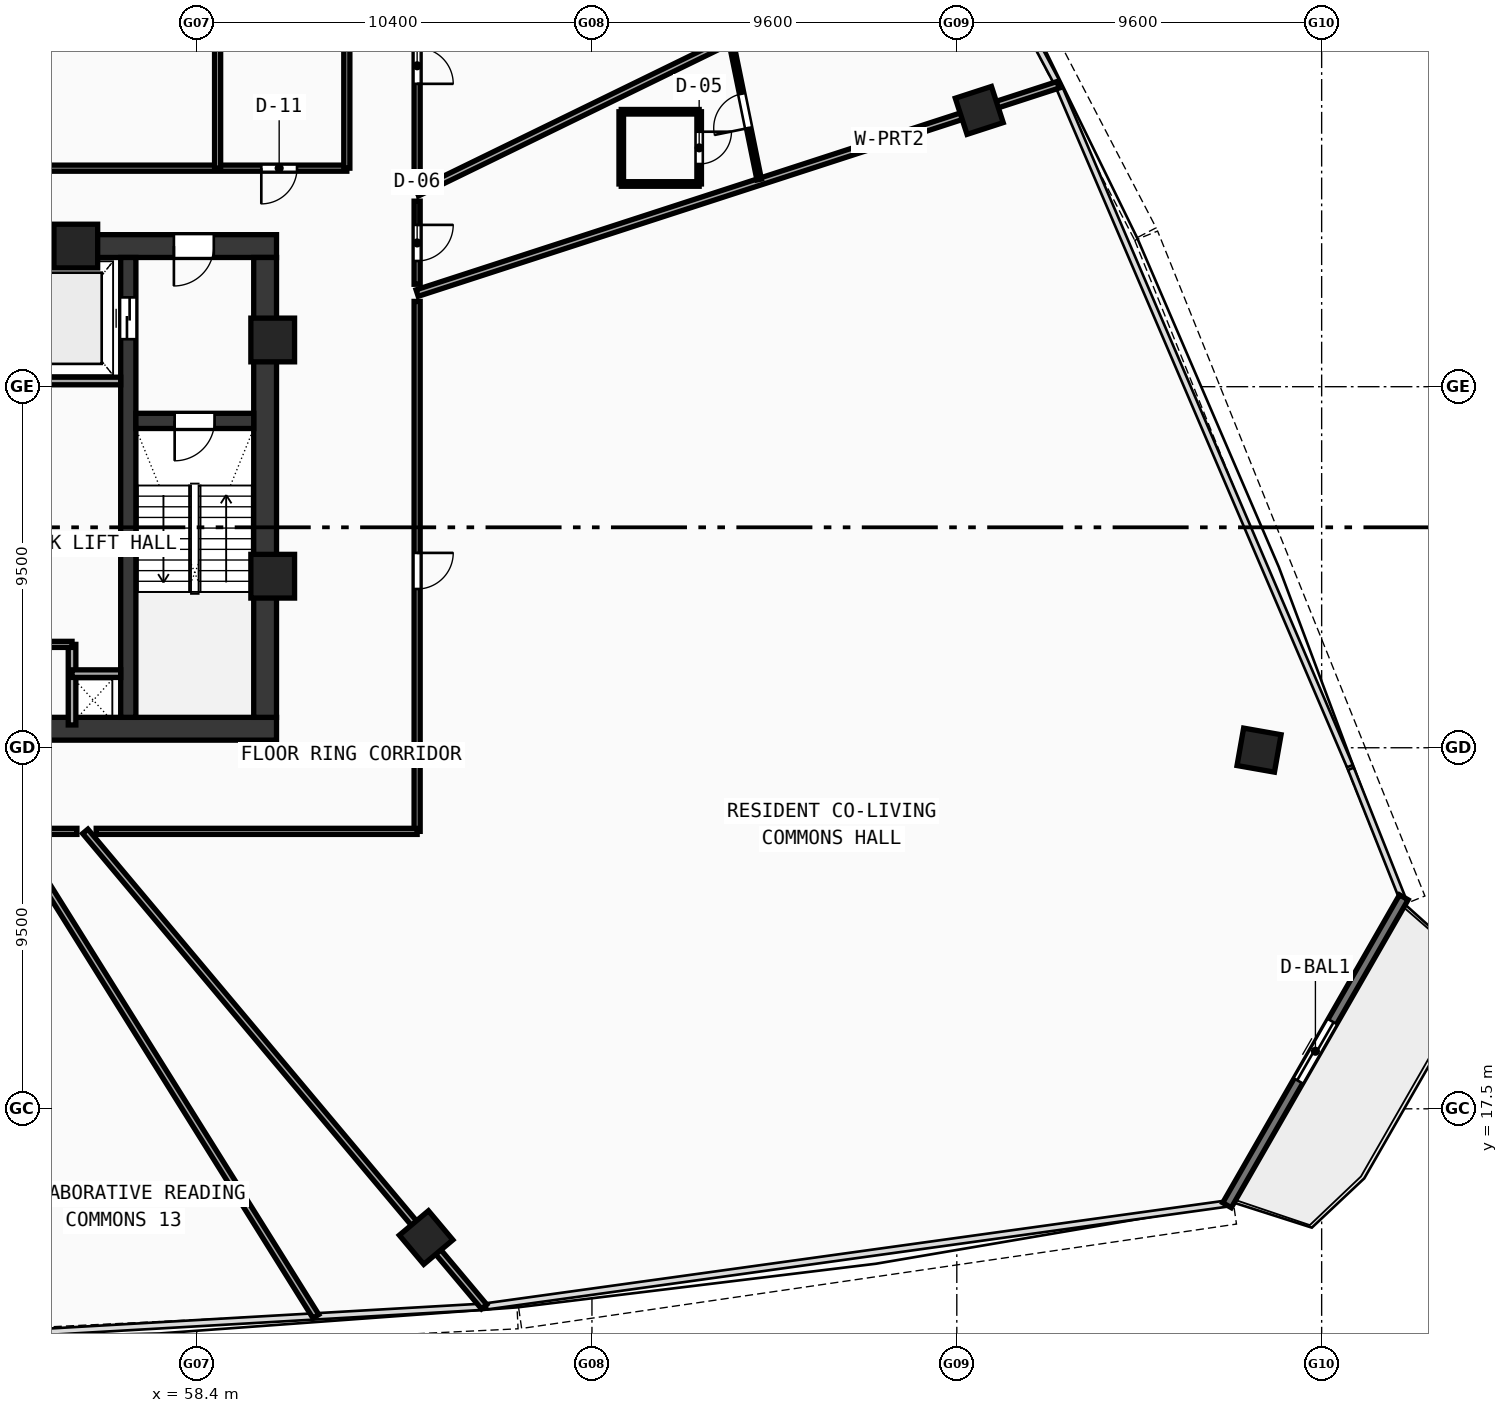
"""IFC4 building model, lengths in metres.
Left out: names, types, materials, properties, quantities, classifications, styles, units other than length and angle.
Written with IfcOpenShell. Run it as: python <this file> out.ifc"""

import sys

from ifc_helpers import new_model, si_unit, direction, frame, frame_2d, origin, origin_with_axes, origin_2d, place, context, subcontext, project, spatial, rectangle, hollow_rectangle, extrude, source, transform, mapped, element, fill, save


model = new_model("IFC4")
c1 = context("Model", 3, precision=1e-05, world=origin(), true_north=direction((0.0, 1.0)))
c2 = subcontext(c1, "Body", "Model", "MODEL_VIEW")
j1 = project(units=[si_unit("LENGTHUNIT", "METRE"), si_unit("PLANEANGLEUNIT", "RADIAN")], contexts=[c1])
p1 = place(None, origin())
s1 = spatial("IfcSite", under=j1, at=p1, CompositionType="ELEMENT")
p2 = place(p1, origin())
s2 = spatial("IfcBuilding", under=s1, at=p2, CompositionType="ELEMENT")
p3 = place(p2, frame((0.0, 0.0, 88.78)))
s3 = spatial("IfcBuildingStorey", under=s2, at=p3, CompositionType="ELEMENT", Elevation=88.78)
p4 = place(p3, frame((35.5, 27.5, 0.0), z_axis=(0.0, 0.0, 1.0), x_axis=(1.0, 0.0, 0.0)))
e1 = element("IfcWall", 1, at=p4, inside=s3, PredefinedType="SHEAR", context=c2, shape_type="SweptSolid", body=[
    extrude(rectangle(XDim=25.0, YDim=0.6, at=frame_2d((12.5, 0.0))), origin(), (0.0, 0.0, 1.0), 3.54),
])
p5 = place(p3, frame((49.2, 40.2, 0.0), z_axis=(0.0, 0.0, 1.0), x_axis=(1.0, 0.0, 0.0)))
e2 = element("IfcWall", 2, at=p5, inside=s3, PredefinedType="SHEAR", context=c2, shape_type="SweptSolid", body=[
    extrude(rectangle(XDim=11.3, YDim=0.6, at=frame_2d((5.65, 0.0))), origin(), (0.0, 0.0, 1.0), 3.54),
])
p6 = place(p5, frame((8.6, 0.0, 0.0)))
e3 = element("IfcOpeningElement", 3, at=p6, cuts=e2, PredefinedType="OPENING", context=c2, shape_type="SweptSolid", body=[
    extrude(rectangle(XDim=1.05, YDim=2.1, at=frame_2d((0.525, 1.05))), frame((0.0, 0.31, 0.0), z_axis=(0.0, -1.0, 0.0), x_axis=(1.0, 0.0, 0.0)), (0.0, 0.0, 1.0), 0.62),
])
p7 = place(p3, frame((60.2, 27.8, 0.0), z_axis=(0.0, 0.0, 1.0), x_axis=(0.0, 1.0, 0.0)))
e4 = element("IfcWall", 4, at=p7, inside=s3, PredefinedType="SHEAR", context=c2, shape_type="SweptSolid", body=[
    extrude(rectangle(XDim=12.1, YDim=0.6, at=frame_2d((6.05, 0.0))), origin(), (0.0, 0.0, 1.0), 3.54),
])
p8 = place(p3, frame((56.6, 27.8, 0.0), z_axis=(0.0, 0.0, 1.0), x_axis=(0.0, 1.0, 0.0)))
e5 = element("IfcWall", 5, at=p8, inside=s3, PredefinedType="SHEAR", context=c2, shape_type="SweptSolid", body=[
    extrude(rectangle(XDim=12.1, YDim=0.4, at=frame_2d((6.05, 0.0))), origin(), (0.0, 0.0, 1.0), 3.54),
])
p9 = place(p8, frame((9.95, 0.0, 0.0)))
e6 = element("IfcOpeningElement", 6, at=p9, cuts=e5, PredefinedType="OPENING", context=c2, shape_type="SweptSolid", body=[
    extrude(rectangle(XDim=1.1, YDim=2.1, at=frame_2d((0.55, 1.05))), frame((0.0, 0.21, 0.0), z_axis=(0.0, -1.0, 0.0), x_axis=(1.0, 0.0, 0.0)), (0.0, 0.0, 1.0), 0.42),
])
p10 = place(p3, frame((56.8, 35.6, 0.0), z_axis=(0.0, 0.0, 1.0), x_axis=(1.0, 0.0, 0.0)))
e7 = element("IfcWall", 7, at=p10, inside=s3, PredefinedType="SHEAR", context=c2, shape_type="SweptSolid", body=[
    extrude(rectangle(XDim=3.1, YDim=0.4, at=frame_2d((1.55, 0.0))), origin(), (0.0, 0.0, 1.0), 3.54),
])
p11 = place(p10, frame((1.02, 0.0, 0.0)))
e8 = element("IfcOpeningElement", 8, at=p11, cuts=e7, PredefinedType="OPENING", context=c2, shape_type="SweptSolid", body=[
    extrude(rectangle(XDim=1.05, YDim=2.1, at=frame_2d((0.525, 1.05))), frame((0.0, 0.21, 0.0), z_axis=(0.0, -1.0, 0.0), x_axis=(1.0, 0.0, 0.0)), (0.0, 0.0, 1.0), 0.42),
])
m1 = source(origin(), c2, "Body", "SweptSolid", [
    extrude(hollow_rectangle(XDim=1.15, YDim=1.15, WallThickness=0.048, at=origin_2d()), origin(), (0.0, 0.0, 1.0), 3.8),
])
for number, where, z_axis, x_axis in (
    (9, (60.4, 31.513, -0.26), (0.0, 0.0, 1.0), (1.0, 0.0, 0.0)),
    (10, (60.4, 37.729, -0.26), (0.0, 0.0, 1.0), (1.0, 0.0, 0.0)),
    (11, (55.219, 40.2, -0.26), (0.0, 0.0, 1.0), (1.0, 0.0, 0.0)),
):
    element("IfcColumn", number, at=place(p3, frame(where, z_axis=z_axis, x_axis=x_axis)), inside=s3, PredefinedType="COLUMN", context=c2, shape_type="MappedRepresentation", body=[
        mapped(m1, transform((0.0, 0.0, 0.0), scale=1.0)),
    ])
m2 = source(origin(), c2, "Body", "SweptSolid", [
    extrude(hollow_rectangle(XDim=1.0, YDim=1.0, WallThickness=0.042, at=origin_2d()), origin(), (0.0, 0.0, 1.0), 3.8),
])
for number, where, z_axis, x_axis in (
    (12, (64.436, 14.112, -0.26), (0.0, 0.0, 1.0), (0.766, 0.643, 0.0)),
    (13, (86.353, 26.938, -0.26), (0.0, 0.0, 1.0), (0.174, 0.985, 0.0)),
    (14, (78.991, 43.77, -0.26), (0.0, 0.0, 1.0), (-0.309, 0.951, 0.0)),
):
    element("IfcColumn", number, at=place(p3, frame(where, z_axis=z_axis, x_axis=x_axis)), inside=s3, PredefinedType="COLUMN", context=c2, shape_type="MappedRepresentation", body=[
        mapped(m2, transform((0.0, 0.0, 0.0), scale=1.0)),
    ])
p12 = place(p3, frame((85.51, 14.963, 0.0), z_axis=(0.0, 0.0, 1.0), x_axis=(0.497922114025, 0.867221752705, 0.0)))
e15 = element("IfcWall", 15, at=p12, inside=s3, PredefinedType="STANDARD", context=c2, shape_type="SweptSolid", body=[
    extrude(rectangle(XDim=9.343, YDim=0.26, at=frame_2d((4.671, 0.0))), origin(), (0.0, 0.0, 1.0), 3.54),
])
p13 = place(p12, frame((3.771, 0.0, 0.0)))
e16 = element("IfcOpeningElement", 16, at=p13, cuts=e15, PredefinedType="OPENING", context=c2, shape_type="SweptSolid", body=[
    extrude(rectangle(XDim=1.8, YDim=2.15, at=frame_2d((0.9, 1.075))), frame((0.0, 0.14, 0.0), z_axis=(0.0, -1.0, 0.0), x_axis=(1.0, 0.0, 0.0)), (0.0, 0.0, 1.0), 0.28),
])
p14 = place(p3, frame((53.68, 36.65, 0.0), z_axis=(0.0, 0.0, 1.0), x_axis=(1.0, 0.0, 0.0)))
e17 = element("IfcWall", 17, at=p14, inside=s3, PredefinedType="SOLIDWALL", context=c2, shape_type="SweptSolid", body=[
    extrude(rectangle(XDim=2.72, YDim=0.2, at=frame_2d((1.36, 0.0))), origin(), (0.0, 0.0, 1.0), 3.54),
])
p15 = place(p3, frame((55.12, 27.6, 0.0), z_axis=(0.0, 0.0, 1.0), x_axis=(0.0, 1.0, 0.0)))
e18 = element("IfcWall", 18, at=p15, inside=s3, PredefinedType="SOLIDWALL", context=c2, shape_type="SweptSolid", body=[
    extrude(rectangle(XDim=2.12, YDim=0.2, at=frame_2d((1.06, 0.0))), origin(), (0.0, 0.0, 1.0), 3.54),
])
p16 = place(p3, frame((55.12, 28.95, 0.0), z_axis=(0.0, 0.0, 1.0), x_axis=(1.0, 0.0, 0.0)))
e19 = element("IfcWall", 19, at=p16, inside=s3, PredefinedType="SOLIDWALL", context=c2, shape_type="SweptSolid", body=[
    extrude(rectangle(XDim=1.28, YDim=0.2, at=frame_2d((0.64, 0.0))), origin(), (0.0, 0.0, 1.0), 3.54),
])
p17 = place(p3, frame((51.05, 29.72, 0.0), z_axis=(0.0, 0.0, 1.0), x_axis=(1.0, 0.0, 0.0)))
e20 = element("IfcWall", 20, at=p17, inside=s3, PredefinedType="PARTITIONING", context=c2, shape_type="SweptSolid", body=[
    extrude(rectangle(XDim=4.07, YDim=0.16, at=frame_2d((2.035, 0.0))), origin(), (0.0, 0.0, 1.0), 3.54),
])
p18 = place(p17, frame((0.5, 0.0, 0.0)))
e21 = element("IfcOpeningElement", 21, at=p18, cuts=e20, PredefinedType="OPENING", context=c2, shape_type="SweptSolid", body=[
    extrude(rectangle(XDim=0.9, YDim=2.1, at=frame_2d((0.45, 1.05))), frame((0.0, 0.09, 0.0), z_axis=(0.0, -1.0, 0.0), x_axis=(1.0, 0.0, 0.0)), (0.0, 0.0, 1.0), 0.18),
])
p19 = place(p3, frame((45.92, 42.25, 0.0), z_axis=(0.0, 0.0, 1.0), x_axis=(1.0, 0.0, 0.0)))
e22 = element("IfcWall", 22, at=p19, inside=s3, PredefinedType="PARTITIONING", context=c2, shape_type="SweptSolid", body=[
    extrude(rectangle(XDim=16.43, YDim=0.16, at=frame_2d((8.215, 0.0))), origin(), (0.0, 0.0, 1.0), 2.84),
])
p20 = place(p19, frame((2.1, 0.0, 0.0)))
e23 = element("IfcOpeningElement", 23, at=p20, cuts=e22, PredefinedType="OPENING", context=c2, shape_type="SweptSolid", body=[
    extrude(rectangle(XDim=0.92, YDim=2.1, at=frame_2d((0.46, 1.05))), frame((0.0, 0.09, 0.0), z_axis=(0.0, -1.0, 0.0), x_axis=(1.0, 0.0, 0.0)), (0.0, 0.0, 1.0), 0.18),
])
p21 = place(p19, frame((14.18, 0.0, 0.0)))
e24 = element("IfcOpeningElement", 24, at=p21, cuts=e22, PredefinedType="OPENING", context=c2, shape_type="SweptSolid", body=[
    extrude(rectangle(XDim=0.94, YDim=2.1, at=frame_2d((0.47, 1.05))), frame((0.0, 0.09, 0.0), z_axis=(0.0, -1.0, 0.0), x_axis=(1.0, 0.0, 0.0)), (0.0, 0.0, 1.0), 0.18),
])
p22 = place(p3, frame((62.35, 42.25, 0.0), z_axis=(0.0, 0.0, 1.0), x_axis=(0.0, 1.0, 0.0)))
e25 = element("IfcWall", 25, at=p22, inside=s3, PredefinedType="PARTITIONING", context=c2, shape_type="SweptSolid", body=[
    extrude(rectangle(XDim=7.55, YDim=0.16, at=frame_2d((3.775, 0.0))), origin(), (0.0, 0.0, 1.0), 2.84),
])
p23 = place(p3, frame((58.95, 42.25, 0.0), z_axis=(0.0, 0.0, 1.0), x_axis=(0.0, 1.0, 0.0)))
e26 = element("IfcWall", 26, at=p23, inside=s3, PredefinedType="PARTITIONING", context=c2, shape_type="SweptSolid", body=[
    extrude(rectangle(XDim=4.35, YDim=0.16, at=frame_2d((2.175, 0.0))), origin(), (0.0, 0.0, 1.0), 2.84),
])
p24 = place(p3, frame((64.2, 38.964, 0.0), z_axis=(0.0, 0.0, 1.0), x_axis=(0.951054301474, 0.309023810812, 0.0)))
e27 = element("IfcWall", 27, at=p24, inside=s3, PredefinedType="PARTITIONING", context=c2, shape_type="SweptSolid", body=[
    extrude(rectangle(XDim=17.733, YDim=0.18, at=frame_2d((8.867, 0.0))), origin(), (0.0, 0.0, 1.0), 2.84),
])
p25 = place(p3, frame((64.2, 41.601, 0.0), z_axis=(0.0, 0.0, 1.0), x_axis=(0.898796049991, 0.438367038588, 0.0)))
e28 = element("IfcWall", 28, at=p25, inside=s3, PredefinedType="PARTITIONING", context=c2, shape_type="SweptSolid", body=[
    extrude(rectangle(XDim=16.234, YDim=0.18, at=frame_2d((8.117, 0.0))), origin(), (0.0, 0.0, 1.0), 2.84),
])
p26 = place(p3, frame((53.561, 24.8, 0.0), z_axis=(0.0, 0.0, 1.0), x_axis=(0.529927477017, -0.848042964184, 0.0)))
e29 = element("IfcWall", 29, at=p26, inside=s3, PredefinedType="PARTITIONING", context=c2, shape_type="SweptSolid", body=[
    extrude(rectangle(XDim=15.048, YDim=0.18, at=frame_2d((7.524, 0.0))), origin(), (0.0, 0.0, 1.0), 2.84),
])
p27 = place(p3, frame((55.468, 24.8, 0.0), z_axis=(0.0, 0.0, 1.0), x_axis=(0.642790086939, -0.76604236445, 0.0)))
e30 = element("IfcWall", 30, at=p27, inside=s3, PredefinedType="PARTITIONING", context=c2, shape_type="SweptSolid", body=[
    extrude(rectangle(XDim=16.326, YDim=0.18, at=frame_2d((8.163, 0.0))), origin(), (0.0, 0.0, 1.0), 2.84),
])
p28 = place(p3, frame((64.2, 48.067, 0.0), z_axis=(0.0, 0.0, 1.0), x_axis=(0.0, -1.0, 0.0)))
e31 = element("IfcWall", 31, at=p28, inside=s3, PredefinedType="PARTITIONING", context=c2, shape_type="SweptSolid", body=[
    extrude(rectangle(XDim=6.221, YDim=0.16, at=frame_2d((3.11, 0.0))), origin(), (0.0, 0.0, 1.0), 2.84),
])
p29 = place(p28, frame((2.648, 0.0, 0.0)))
e32 = element("IfcOpeningElement", 32, at=p29, cuts=e31, PredefinedType="OPENING", context=c2, shape_type="SweptSolid", body=[
    extrude(rectangle(XDim=0.95, YDim=2.1, at=frame_2d((0.475, 1.05))), frame((0.0, 0.09, 0.0), z_axis=(0.0, -1.0, 0.0), x_axis=(1.0, 0.0, 0.0)), (0.0, 0.0, 1.0), 0.18),
])
p30 = place(p3, frame((64.2, 41.382, 0.0), z_axis=(0.0, 0.0, 1.0), x_axis=(0.0, -1.0, 0.0)))
e33 = element("IfcWall", 33, at=p30, inside=s3, PredefinedType="PARTITIONING", context=c2, shape_type="SweptSolid", body=[
    extrude(rectangle(XDim=2.187, YDim=0.16, at=frame_2d((1.093, 0.0))), origin(), (0.0, 0.0, 1.0), 3.54),
])
p31 = place(p30, frame((0.624, 0.0, 0.0)))
e34 = element("IfcOpeningElement", 34, at=p31, cuts=e33, PredefinedType="OPENING", context=c2, shape_type="SweptSolid", body=[
    extrude(rectangle(XDim=0.95, YDim=2.1, at=frame_2d((0.475, 1.05))), frame((0.0, 0.09, 0.0), z_axis=(0.0, -1.0, 0.0), x_axis=(1.0, 0.0, 0.0)), (0.0, 0.0, 1.0), 0.18),
])
p32 = place(p3, frame((64.2, 38.744, 0.0), z_axis=(0.0, 0.0, 1.0), x_axis=(0.0, -1.0, 0.0)))
e35 = element("IfcWall", 35, at=p32, inside=s3, PredefinedType="PARTITIONING", context=c2, shape_type="SweptSolid", body=[
    extrude(rectangle(XDim=13.944, YDim=0.16, at=frame_2d((6.972, 0.0))), origin(), (0.0, 0.0, 1.0), 2.84),
])
p33 = place(p32, frame((6.617, 0.0, 0.0)))
e36 = element("IfcOpeningElement", 36, at=p33, cuts=e35, PredefinedType="OPENING", context=c2, shape_type="SweptSolid", body=[
    extrude(rectangle(XDim=0.95, YDim=2.1, at=frame_2d((0.475, 1.05))), frame((0.0, 0.09, 0.0), z_axis=(0.0, -1.0, 0.0), x_axis=(1.0, 0.0, 0.0)), (0.0, 0.0, 1.0), 0.18),
])
p34 = place(p3, frame((64.2, 24.8, 0.0), z_axis=(0.0, 0.0, 1.0), x_axis=(-1.0, 0.0, 0.0)))
e37 = element("IfcWall", 37, at=p34, inside=s3, PredefinedType="PARTITIONING", context=c2, shape_type="SweptSolid", body=[
    extrude(rectangle(XDim=8.445, YDim=0.16, at=frame_2d((4.222, 0.0))), origin(), (0.0, 0.0, 1.0), 3.14),
])
p35 = place(p3, frame((55.248, 24.8, 0.0), z_axis=(0.0, 0.0, 1.0), x_axis=(-1.0, 0.0, 0.0)))
e38 = element("IfcWall", 38, at=p35, inside=s3, PredefinedType="PARTITIONING", context=c2, shape_type="SweptSolid", body=[
    extrude(rectangle(XDim=1.427, YDim=0.16, at=frame_2d((0.714, 0.0))), origin(), (0.0, 0.0, 1.0), 2.84),
])
p36 = place(p3, frame((69.571, 41.834, 0.0), z_axis=(0.0, 0.0, 1.0), x_axis=(1.0, 0.0, 0.0)))
e39 = element("IfcWall", 39, at=p36, inside=s3, PredefinedType="PARTITIONING", context=c2, shape_type="SweptSolid", body=[
    extrude(rectangle(XDim=2.05, YDim=0.12, at=frame_2d((1.025, 0.0))), origin(), (0.0, 0.0, 1.0), 3.54),
])
p37 = place(p3, frame((71.621, 41.834, 0.0), z_axis=(0.0, 0.0, 1.0), x_axis=(0.0, 1.0, 0.0)))
e40 = element("IfcWall", 40, at=p37, inside=s3, PredefinedType="PARTITIONING", context=c2, shape_type="SweptSolid", body=[
    extrude(rectangle(XDim=1.9, YDim=0.12, at=frame_2d((0.95, 0.0))), origin(), (0.0, 0.0, 1.0), 3.14),
])
p38 = place(p37, frame((0.525, 0.0, 0.0)))
e41 = element("IfcOpeningElement", 41, at=p38, cuts=e40, PredefinedType="OPENING", context=c2, shape_type="SweptSolid", body=[
    extrude(rectangle(XDim=0.85, YDim=2.1, at=frame_2d((0.425, 1.05))), frame((0.0, 0.07, 0.0), z_axis=(0.0, -1.0, 0.0), x_axis=(1.0, 0.0, 0.0)), (0.0, 0.0, 1.0), 0.14),
])
p39 = place(p3, frame((71.621, 43.734, 0.0), z_axis=(0.0, 0.0, 1.0), x_axis=(-1.0, 0.0, 0.0)))
e42 = element("IfcWall", 42, at=p39, inside=s3, PredefinedType="PARTITIONING", context=c2, shape_type="SweptSolid", body=[
    extrude(rectangle(XDim=2.05, YDim=0.12, at=frame_2d((1.025, 0.0))), origin(), (0.0, 0.0, 1.0), 3.54),
])
p40 = place(p3, frame((69.571, 43.734, 0.0), z_axis=(0.0, 0.0, 1.0), x_axis=(0.0, -1.0, 0.0)))
e43 = element("IfcWall", 43, at=p40, inside=s3, PredefinedType="PARTITIONING", context=c2, shape_type="SweptSolid", body=[
    extrude(rectangle(XDim=1.9, YDim=0.12, at=frame_2d((0.95, 0.0))), origin(), (0.0, 0.0, 1.0), 3.54),
])
p41 = place(p3, frame((73.2, 41.951, 0.0), z_axis=(0.0, 0.0, 1.0), x_axis=(-0.199717476268, 0.979853524601, 0.0)))
e44 = element("IfcWall", 44, at=p41, inside=s3, PredefinedType="PARTITIONING", context=c2, shape_type="SweptSolid", body=[
    extrude(rectangle(XDim=3.688, YDim=0.12, at=frame_2d((1.844, 0.0))), origin(), (0.0, 0.0, 1.0), 2.84),
])
p42 = place(p41, frame((1.384, 0.0, 0.0)))
e45 = element("IfcOpeningElement", 45, at=p42, cuts=e44, PredefinedType="OPENING", context=c2, shape_type="SweptSolid", body=[
    extrude(rectangle(XDim=0.92, YDim=2.1, at=frame_2d((0.46, 1.05))), frame((0.0, 0.07, 0.0), z_axis=(0.0, -1.0, 0.0), x_axis=(1.0, 0.0, 0.0)), (0.0, 0.0, 1.0), 0.14),
])
m3 = source(origin(), c2, "Body", "SweptSolid", [
    extrude(rectangle(XDim=1.8, YDim=2.15, at=frame_2d((0.9, 1.075))), frame((0.0, 0.025, 0.0), z_axis=(0.0, -1.0, 0.0), x_axis=(1.0, 0.0, 0.0)), (0.0, 0.0, 1.0), 0.05),
])
p43 = place(p13, origin_with_axes())
e46 = element("IfcDoor", 46, at=p43, inside=s3, OperationType="DOUBLE_DOOR_SLIDING", PredefinedType="DOOR", context=c2, shape_type="MappedRepresentation", body=[
    mapped(m3, transform((0.0, 0.0, 0.0), scale=1.0)),
])
fill(e16, e46)
m4 = source(origin(), c2, "Body", "SweptSolid", [
    extrude(rectangle(XDim=1.05, YDim=2.1, at=frame_2d((0.525, 1.05))), frame((0.0, 0.025, 0.0), z_axis=(0.0, -1.0, 0.0), x_axis=(1.0, 0.0, 0.0)), (0.0, 0.0, 1.0), 0.05),
])
p44 = place(p11, frame((1.05, 0.0, 0.0), z_axis=(0.0, 0.0, 1.0), x_axis=(-1.0, 0.0, 0.0)))
e47 = element("IfcDoor", 47, at=p44, inside=s3, OperationType="SINGLE_SWING_RIGHT", PredefinedType="DOOR", context=c2, shape_type="MappedRepresentation", body=[
    mapped(m4, transform((0.0, 0.0, 0.0), scale=1.0)),
])
fill(e8, e47)
p45 = place(p6, frame((1.05, 0.0, 0.0), z_axis=(0.0, 0.0, 1.0), x_axis=(-1.0, 0.0, 0.0)))
e48 = element("IfcDoor", 48, at=p45, inside=s3, OperationType="SINGLE_SWING_RIGHT", PredefinedType="DOOR", context=c2, shape_type="MappedRepresentation", body=[
    mapped(m4, transform((0.0, 0.0, 0.0), scale=1.0)),
])
fill(e3, e48)
m5 = source(origin(), c2, "Body", "SweptSolid", [
    extrude(rectangle(XDim=1.1, YDim=2.1, at=frame_2d((0.55, 1.05))), frame((0.0, 0.025, 0.0), z_axis=(0.0, -1.0, 0.0), x_axis=(1.0, 0.0, 0.0)), (0.0, 0.0, 1.0), 0.05),
])
p46 = place(p9, origin_with_axes())
e49 = element("IfcDoor", 49, at=p46, inside=s3, OperationType="DOUBLE_DOOR_SLIDING", PredefinedType="DOOR", context=c2, shape_type="MappedRepresentation", body=[
    mapped(m5, transform((0.0, 0.0, 0.0), scale=1.0)),
])
fill(e6, e49)
m6 = source(origin(), c2, "Body", "SweptSolid", [
    extrude(rectangle(XDim=0.94, YDim=2.1, at=frame_2d((0.47, 1.05))), frame((0.0, 0.025, 0.0), z_axis=(0.0, -1.0, 0.0), x_axis=(1.0, 0.0, 0.0)), (0.0, 0.0, 1.0), 0.05),
])
p47 = place(p21, frame((0.94, 0.0, 0.0), z_axis=(0.0, 0.0, 1.0), x_axis=(-1.0, 0.0, 0.0)))
e50 = element("IfcDoor", 50, at=p47, inside=s3, OperationType="SINGLE_SWING_RIGHT", PredefinedType="DOOR", context=c2, shape_type="MappedRepresentation", body=[
    mapped(m6, transform((0.0, 0.0, 0.0), scale=1.0)),
])
fill(e24, e50)
m7 = source(origin(), c2, "Body", "SweptSolid", [
    extrude(rectangle(XDim=0.95, YDim=2.1, at=frame_2d((0.475, 1.05))), frame((0.0, 0.025, 0.0), z_axis=(0.0, -1.0, 0.0), x_axis=(1.0, 0.0, 0.0)), (0.0, 0.0, 1.0), 0.05),
])
p48 = place(p31, origin_with_axes())
e51 = element("IfcDoor", 51, at=p48, inside=s3, OperationType="SINGLE_SWING_LEFT", PredefinedType="DOOR", context=c2, shape_type="MappedRepresentation", body=[
    mapped(m7, transform((0.0, 0.0, 0.0), scale=1.0)),
])
fill(e34, e51)
m8 = source(origin(), c2, "Body", "SweptSolid", [
    extrude(rectangle(XDim=0.85, YDim=2.1, at=frame_2d((0.425, 1.05))), frame((0.0, 0.025, 0.0), z_axis=(0.0, -1.0, 0.0), x_axis=(1.0, 0.0, 0.0)), (0.0, 0.0, 1.0), 0.05),
])
p49 = place(p38, frame((0.85, 0.0, 0.0), z_axis=(0.0, 0.0, 1.0), x_axis=(-1.0, 0.0, 0.0)))
e52 = element("IfcDoor", 52, at=p49, inside=s3, OperationType="SINGLE_SWING_LEFT", PredefinedType="DOOR", context=c2, shape_type="MappedRepresentation", body=[
    mapped(m8, transform((0.0, 0.0, 0.0), scale=1.0)),
])
fill(e41, e52)
m9 = source(origin(), c2, "Body", "SweptSolid", [
    extrude(rectangle(XDim=0.92, YDim=2.1, at=frame_2d((0.46, 1.05))), frame((0.0, 0.025, 0.0), z_axis=(0.0, -1.0, 0.0), x_axis=(1.0, 0.0, 0.0)), (0.0, 0.0, 1.0), 0.05),
])
p50 = place(p42, origin_with_axes())
e53 = element("IfcDoor", 53, at=p50, inside=s3, OperationType="SINGLE_SWING_LEFT", PredefinedType="DOOR", context=c2, shape_type="MappedRepresentation", body=[
    mapped(m9, transform((0.0, 0.0, 0.0), scale=1.0)),
])
fill(e45, e53)
p51 = place(p29, origin_with_axes())
e54 = element("IfcDoor", 54, at=p51, inside=s3, OperationType="SINGLE_SWING_RIGHT", PredefinedType="DOOR", context=c2, shape_type="MappedRepresentation", body=[
    mapped(m7, transform((0.0, 0.0, 0.0), scale=1.0)),
])
fill(e32, e54)
p52 = place(p33, origin_with_axes())
e55 = element("IfcDoor", 55, at=p52, inside=s3, OperationType="SINGLE_SWING_LEFT", PredefinedType="DOOR", context=c2, shape_type="MappedRepresentation", body=[
    mapped(m7, transform((0.0, 0.0, 0.0), scale=1.0)),
])
fill(e36, e55)
save(model, sys.argv[1])
